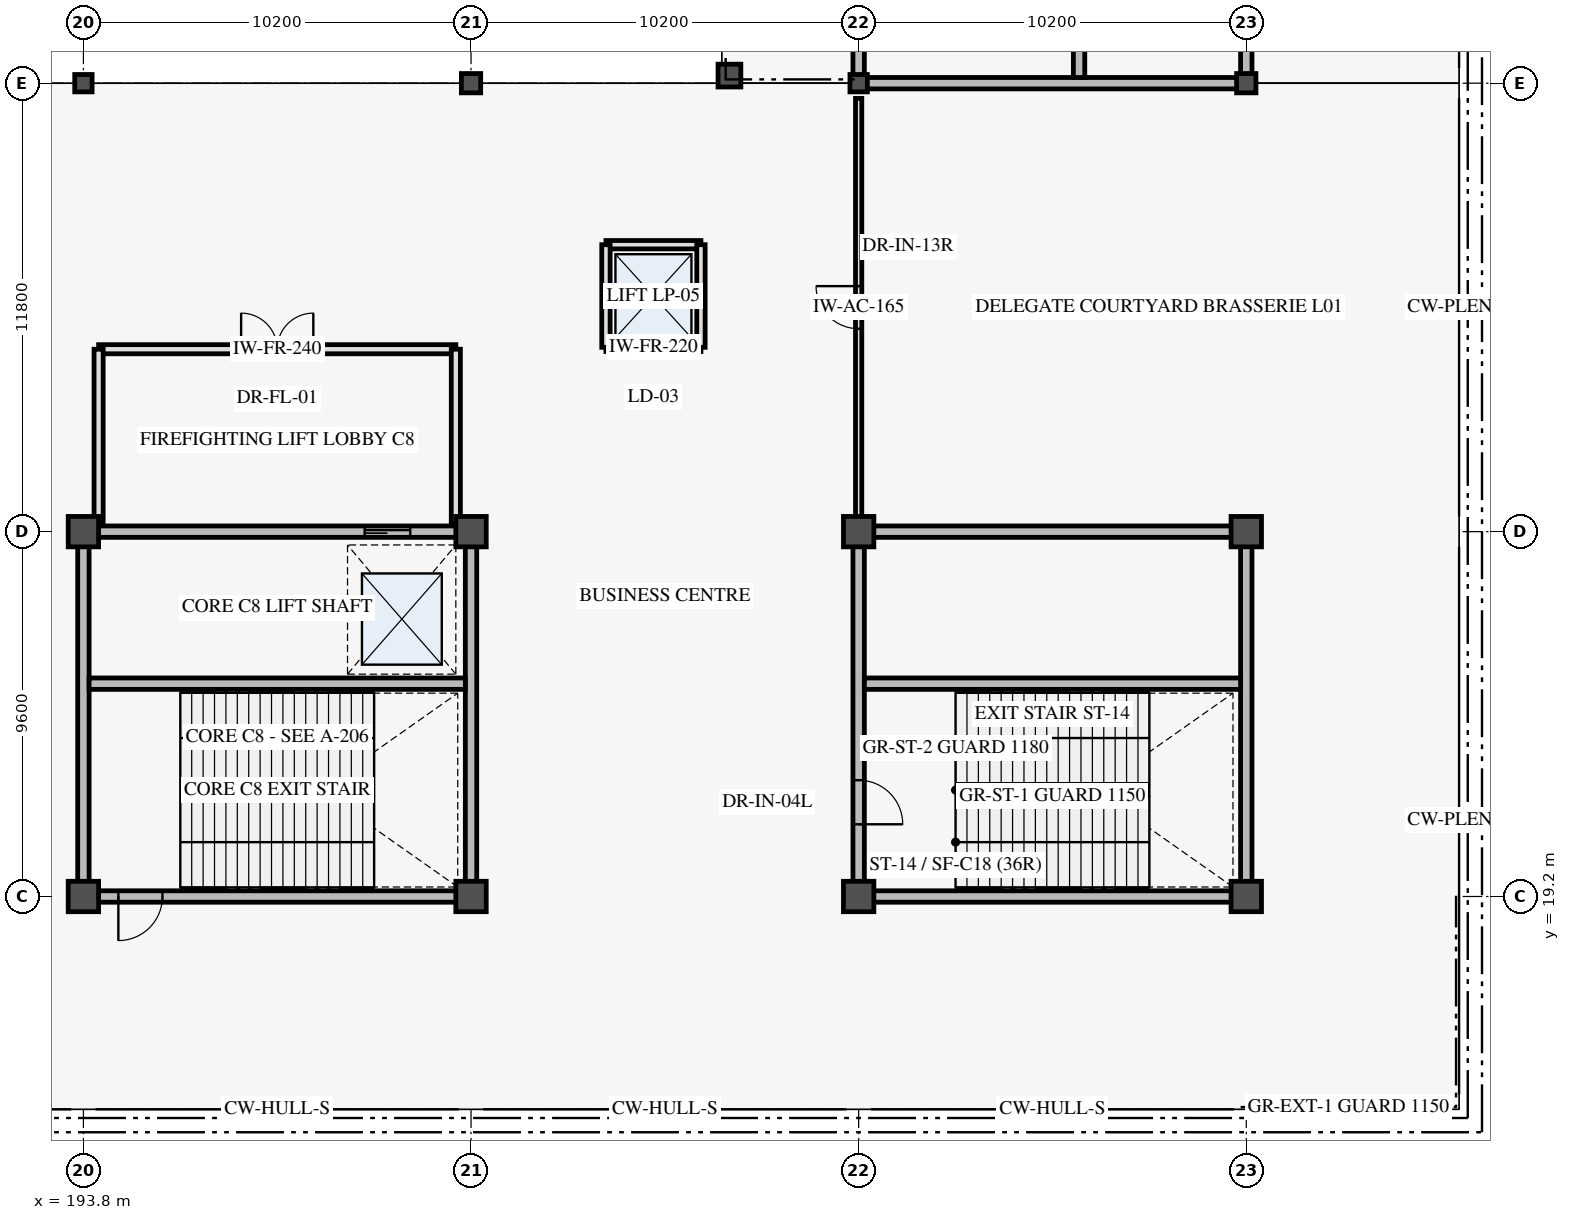
"""IFC4 building model, lengths in metres.
Left out: names, types, materials, properties, quantities, classifications, styles, units other than length and angle.
Written with IfcOpenShell. Run it as: python <this file> out.ifc"""

import sys

from ifc_helpers import new_model, si_unit, direction, frame, frame_2d, origin, origin_2d, place, context, subcontext, project, spatial, rectangle, hollow_circle, extrude, element, fill, save


model = new_model("IFC4")
c1 = context("Model", 3, precision=1e-05, world=origin(), true_north=direction((0.0, 1.0)))
c2 = subcontext(c1, "Body", "Model", "MODEL_VIEW")
j1 = project(units=[si_unit("LENGTHUNIT", "METRE"), si_unit("PLANEANGLEUNIT", "RADIAN")], contexts=[c1])
p1 = place(None, origin())
s1 = spatial("IfcSite", under=j1, at=p1, CompositionType="ELEMENT")
p2 = place(p1, origin())
s2 = spatial("IfcBuilding", under=s1, at=p2, CompositionType="ELEMENT")
p3 = place(p2, frame((0.0, 0.0, 5.4)))
s3 = spatial("IfcBuildingStorey", under=s2, at=p3, CompositionType="ELEMENT", Elevation=5.4)
for number, where, z_axis, x_axis in (
    (1, (193.8, 19.2, 0.0), (0.0, 0.0, 1.0), (1.0, 0.0, 0.0)),
    (2, (193.8, 28.8, 0.0), (0.0, 0.0, 1.0), (1.0, 0.0, 0.0)),
):
    element("IfcColumn", number, at=place(p3, frame(where, z_axis=z_axis, x_axis=x_axis)), inside=s3, PredefinedType="COLUMN", context=c2, shape_type="SweptSolid", body=[
        extrude(rectangle(XDim=0.8, YDim=0.8, at=origin_2d()), origin(), (0.0, 0.0, 1.0), 5.4),
    ])
p4 = place(p3, frame((193.8, 40.6, 0.0), z_axis=(0.0, 0.0, 1.0), x_axis=(1.0, 0.0, 0.0)))
e3 = element("IfcColumn", 3, at=p4, inside=s3, PredefinedType="COLUMN", context=c2, shape_type="SweptSolid", body=[
    extrude(hollow_circle(Radius=0.229, WallThickness=0.02, at=origin_2d()), origin(), (0.0, 0.0, 1.0), 5.4),
])
for number, where, z_axis, x_axis in (
    (4, (204.0, 19.2, 0.0), (0.0, 0.0, 1.0), (1.0, 0.0, 0.0)),
    (5, (204.0, 28.8, 0.0), (0.0, 0.0, 1.0), (1.0, 0.0, 0.0)),
):
    element("IfcColumn", number, at=place(p3, frame(where, z_axis=z_axis, x_axis=x_axis)), inside=s3, PredefinedType="COLUMN", context=c2, shape_type="SweptSolid", body=[
        extrude(rectangle(XDim=0.8, YDim=0.8, at=origin_2d()), origin(), (0.0, 0.0, 1.0), 5.4),
    ])
p5 = place(p3, frame((204.0, 40.6, 0.0), z_axis=(0.0, 0.0, 1.0), x_axis=(1.0, 0.0, 0.0)))
e6 = element("IfcColumn", 6, at=p5, inside=s3, PredefinedType="COLUMN", context=c2, shape_type="SweptSolid", body=[
    extrude(hollow_circle(Radius=0.254, WallThickness=0.02, at=origin_2d()), origin(), (0.0, 0.0, 1.0), 5.4),
])
for number, where, z_axis, x_axis in (
    (7, (214.2, 19.2, 0.0), (0.0, 0.0, 1.0), (1.0, 0.0, 0.0)),
    (8, (214.2, 28.8, 0.0), (0.0, 0.0, 1.0), (1.0, 0.0, 0.0)),
):
    element("IfcColumn", number, at=place(p3, frame(where, z_axis=z_axis, x_axis=x_axis)), inside=s3, PredefinedType="COLUMN", context=c2, shape_type="SweptSolid", body=[
        extrude(rectangle(XDim=0.8, YDim=0.8, at=origin_2d()), origin(), (0.0, 0.0, 1.0), 5.4),
    ])
p6 = place(p3, frame((214.2, 40.6, 0.0), z_axis=(0.0, 0.0, 1.0), x_axis=(1.0, 0.0, 0.0)))
e9 = element("IfcColumn", 9, at=p6, inside=s3, PredefinedType="COLUMN", context=c2, shape_type="SweptSolid", body=[
    extrude(hollow_circle(Radius=0.229, WallThickness=0.02, at=origin_2d()), origin(), (0.0, 0.0, 1.0), 5.4),
])
for number, where, z_axis, x_axis in (
    (10, (224.4, 19.2, 0.0), (0.0, 0.0, 1.0), (1.0, 0.0, 0.0)),
    (11, (224.4, 28.8, 0.0), (0.0, 0.0, 1.0), (1.0, 0.0, 0.0)),
):
    element("IfcColumn", number, at=place(p3, frame(where, z_axis=z_axis, x_axis=x_axis)), inside=s3, PredefinedType="COLUMN", context=c2, shape_type="SweptSolid", body=[
        extrude(rectangle(XDim=0.8, YDim=0.8, at=origin_2d()), origin(), (0.0, 0.0, 1.0), 5.4),
    ])
p7 = place(p3, frame((224.4, 40.6, 0.0), z_axis=(0.0, 0.0, 1.0), x_axis=(1.0, 0.0, 0.0)))
e12 = element("IfcColumn", 12, at=p7, inside=s3, PredefinedType="COLUMN", context=c2, shape_type="SweptSolid", body=[
    extrude(hollow_circle(Radius=0.254, WallThickness=0.02, at=origin_2d()), origin(), (0.0, 0.0, 1.0), 5.4),
])
p8 = place(p3, frame((193.8, 19.2, 0.0), z_axis=(0.0, 0.0, 1.0), x_axis=(1.0, 0.0, 0.0)))
e13 = element("IfcWall", 13, at=p8, inside=s3, PredefinedType="SHEAR", context=c2, shape_type="SweptSolid", body=[
    extrude(rectangle(XDim=10.2, YDim=0.3, at=frame_2d((5.1, 0.0))), origin(), (0.0, 0.0, 1.0), 5.4),
])
p9 = place(p8, frame((0.92, 0.0, 0.0)))
e14 = element("IfcOpeningElement", 14, at=p9, cuts=e13, PredefinedType="OPENING", context=c2, shape_type="SweptSolid", body=[
    extrude(rectangle(XDim=1.16, YDim=2.2, at=frame_2d((0.58, 1.1))), frame((0.0, 0.16, 0.0), z_axis=(0.0, -1.0, 0.0), x_axis=(1.0, 0.0, 0.0)), (0.0, 0.0, 1.0), 0.32),
])
p10 = place(p3, frame((193.8, 28.8, 0.0), z_axis=(0.0, 0.0, 1.0), x_axis=(1.0, 0.0, 0.0)))
e15 = element("IfcWall", 15, at=p10, inside=s3, PredefinedType="SHEAR", context=c2, shape_type="SweptSolid", body=[
    extrude(rectangle(XDim=10.2, YDim=0.3, at=frame_2d((5.1, 0.0))), origin(), (0.0, 0.0, 1.0), 5.4),
])
p11 = place(p10, frame((7.4, 0.0, 0.0)))
e16 = element("IfcOpeningElement", 16, at=p11, cuts=e15, PredefinedType="OPENING", context=c2, shape_type="SweptSolid", body=[
    extrude(rectangle(XDim=1.2, YDim=2.25, at=frame_2d((0.6, 1.125))), frame((0.0, 0.16, 0.0), z_axis=(0.0, -1.0, 0.0), x_axis=(1.0, 0.0, 0.0)), (0.0, 0.0, 1.0), 0.32),
])
for number, where, z_axis, x_axis in (
    (17, (193.8, 19.2, 0.0), (0.0, 0.0, 1.0), (0.0, 1.0, 0.0)),
    (18, (204.0, 19.2, 0.0), (0.0, 0.0, 1.0), (0.0, 1.0, 0.0)),
):
    element("IfcWall", number, at=place(p3, frame(where, z_axis=z_axis, x_axis=x_axis)), inside=s3, PredefinedType="SHEAR", context=c2, shape_type="SweptSolid", body=[
        extrude(rectangle(XDim=9.6, YDim=0.3, at=frame_2d((4.8, 0.0))), origin(), (0.0, 0.0, 1.0), 5.4),
    ])
p12 = place(p3, frame((210.8, 40.8, 0.0), z_axis=(0.0, 0.0, 1.0), x_axis=(1.0, 0.0, 0.0)))
e19 = element("IfcColumn", 19, at=p12, inside=s3, PredefinedType="COLUMN", context=c2, shape_type="SweptSolid", body=[
    extrude(rectangle(XDim=0.6, YDim=0.6, at=origin_2d()), origin(), (0.0, 0.0, 1.0), 5.12),
])
p13 = place(p3, frame((193.95, 24.8, 0.0), z_axis=(0.0, 0.0, 1.0), x_axis=(1.0, 0.0, 0.0)))
e20 = element("IfcWall", 20, at=p13, inside=s3, PredefinedType="SHEAR", context=c2, shape_type="SweptSolid", body=[
    extrude(rectangle(XDim=9.9, YDim=0.3, at=frame_2d((4.95, 0.0))), origin(), (0.0, 0.0, 1.0), 5.4),
])
for number, where, z_axis, x_axis in (
    (21, (214.2, 19.2, 0.0), (0.0, 0.0, 1.0), (1.0, 0.0, 0.0)),
    (22, (214.2, 28.8, 0.0), (0.0, 0.0, 1.0), (1.0, 0.0, 0.0)),
):
    element("IfcWall", number, at=place(p3, frame(where, z_axis=z_axis, x_axis=x_axis)), inside=s3, PredefinedType="SHEAR", context=c2, shape_type="SweptSolid", body=[
        extrude(rectangle(XDim=10.2, YDim=0.3, at=frame_2d((5.1, 0.0))), origin(), (0.0, 0.0, 1.0), 5.4),
    ])
p14 = place(p3, frame((214.2, 19.2, 0.0), z_axis=(0.0, 0.0, 1.0), x_axis=(0.0, 1.0, 0.0)))
e23 = element("IfcWall", 23, at=p14, inside=s3, PredefinedType="SHEAR", context=c2, shape_type="SweptSolid", body=[
    extrude(rectangle(XDim=9.6, YDim=0.3, at=frame_2d((4.8, 0.0))), origin(), (0.0, 0.0, 1.0), 5.4),
])
p15 = place(p14, frame((1.9, 0.0, 0.0)))
e24 = element("IfcOpeningElement", 24, at=p15, cuts=e23, PredefinedType="OPENING", context=c2, shape_type="SweptSolid", body=[
    extrude(rectangle(XDim=1.16, YDim=2.2, at=frame_2d((0.58, 1.1))), frame((0.0, 0.16, 0.0), z_axis=(0.0, -1.0, 0.0), x_axis=(1.0, 0.0, 0.0)), (0.0, 0.0, 1.0), 0.32),
])
p16 = place(p3, frame((224.4, 19.2, 0.0), z_axis=(0.0, 0.0, 1.0), x_axis=(0.0, 1.0, 0.0)))
e25 = element("IfcWall", 25, at=p16, inside=s3, PredefinedType="SHEAR", context=c2, shape_type="SweptSolid", body=[
    extrude(rectangle(XDim=9.6, YDim=0.3, at=frame_2d((4.8, 0.0))), origin(), (0.0, 0.0, 1.0), 5.4),
])
p17 = place(p3, frame((214.35, 24.8, 0.0), z_axis=(0.0, 0.0, 1.0), x_axis=(1.0, 0.0, 0.0)))
e26 = element("IfcWall", 26, at=p17, inside=s3, PredefinedType="SHEAR", context=c2, shape_type="SweptSolid", body=[
    extrude(rectangle(XDim=9.9, YDim=0.3, at=frame_2d((4.95, 0.0))), origin(), (0.0, 0.0, 1.0), 5.4),
])
p18 = place(p3, frame((214.2, 40.6, 0.0), z_axis=(0.0, 0.0, 1.0), x_axis=(1.0, 0.0, 0.0)))
e27 = element("IfcWall", 27, at=p18, inside=s3, PredefinedType="SHEAR", context=c2, shape_type="SweptSolid", body=[
    extrude(rectangle(XDim=10.2, YDim=0.3, at=frame_2d((5.1, 0.0))), origin(), (0.0, 0.0, 1.0), 5.4),
])
p19 = place(p3, frame((214.2, 40.6, 0.0), z_axis=(0.0, 0.0, 1.0), x_axis=(0.0, 1.0, 0.0)))
e28 = element("IfcWall", 28, at=p19, inside=s3, PredefinedType="SHEAR", context=c2, shape_type="SweptSolid", body=[
    extrude(rectangle(XDim=11.8, YDim=0.3, at=frame_2d((5.9, 0.0))), origin(), (0.0, 0.0, 1.0), 5.4),
])
p20 = place(p19, frame((0.92, 0.0, 0.0)))
e29 = element("IfcOpeningElement", 29, at=p20, cuts=e28, PredefinedType="OPENING", context=c2, shape_type="SweptSolid", body=[
    extrude(rectangle(XDim=1.16, YDim=2.2, at=frame_2d((0.58, 1.1))), frame((0.0, 0.16, 0.0), z_axis=(0.0, -1.0, 0.0), x_axis=(1.0, 0.0, 0.0)), (0.0, 0.0, 1.0), 0.32),
])
p21 = place(p3, frame((224.4, 40.6, 0.0), z_axis=(0.0, 0.0, 1.0), x_axis=(0.0, 1.0, 0.0)))
e30 = element("IfcWall", 30, at=p21, inside=s3, PredefinedType="SHEAR", context=c2, shape_type="SweptSolid", body=[
    extrude(rectangle(XDim=11.8, YDim=0.3, at=frame_2d((5.9, 0.0))), origin(), (0.0, 0.0, 1.0), 5.4),
])
p22 = place(p3, frame((220.0, 40.75, 0.0), z_axis=(0.0, 0.0, 1.0), x_axis=(0.0, 1.0, 0.0)))
e31 = element("IfcWall", 31, at=p22, inside=s3, PredefinedType="SHEAR", context=c2, shape_type="SweptSolid", body=[
    extrude(rectangle(XDim=11.5, YDim=0.3, at=frame_2d((5.75, 0.0))), origin(), (0.0, 0.0, 1.0), 5.4),
])
p23 = place(p3, frame((207.55, 33.65, 0.0), z_axis=(0.0, 0.0, 1.0), x_axis=(1.0, 0.0, 0.0)))
e32 = element("IfcWall", 32, at=p23, inside=s3, PredefinedType="PARTITIONING", context=c2, shape_type="SweptSolid", body=[
    extrude(rectangle(XDim=2.5, YDim=0.22, at=frame_2d((1.25, 0.0))), origin(), (0.0, 0.0, 1.0), 5.12),
])
p24 = place(p23, frame((0.575, 0.0, 0.0)))
e33 = element("IfcOpeningElement", 33, at=p24, cuts=e32, PredefinedType="OPENING", context=c2, shape_type="SweptSolid", body=[
    extrude(rectangle(XDim=1.35, YDim=2.3, at=frame_2d((0.675, 1.15))), frame((0.0, 0.12, 0.0), z_axis=(0.0, -1.0, 0.0), x_axis=(1.0, 0.0, 0.0)), (0.0, 0.0, 1.0), 0.24),
])
p25 = place(p3, frame((207.55, 36.35, 0.0), z_axis=(0.0, 0.0, 1.0), x_axis=(1.0, 0.0, 0.0)))
e34 = element("IfcWall", 34, at=p25, inside=s3, PredefinedType="PARTITIONING", context=c2, shape_type="SweptSolid", body=[
    extrude(rectangle(XDim=2.5, YDim=0.22, at=frame_2d((1.25, 0.0))), origin(), (0.0, 0.0, 1.0), 5.12),
])
for number, where, z_axis, x_axis in (
    (35, (207.55, 33.65, 0.0), (0.0, 0.0, 1.0), (0.0, 1.0, 0.0)),
    (36, (210.05, 33.65, 0.0), (0.0, 0.0, 1.0), (0.0, 1.0, 0.0)),
):
    element("IfcWall", number, at=place(p3, frame(where, z_axis=z_axis, x_axis=x_axis)), inside=s3, PredefinedType="PARTITIONING", context=c2, shape_type="SweptSolid", body=[
        extrude(rectangle(XDim=2.7, YDim=0.22, at=frame_2d((1.35, 0.0))), origin(), (0.0, 0.0, 1.0), 5.12),
    ])
p26 = place(p3, frame((194.2, 33.6, 0.0), z_axis=(0.0, 0.0, 1.0), x_axis=(1.0, 0.0, 0.0)))
e37 = element("IfcWall", 37, at=p26, inside=s3, PredefinedType="PARTITIONING", context=c2, shape_type="SweptSolid", body=[
    extrude(rectangle(XDim=9.4, YDim=0.24, at=frame_2d((4.7, 0.0))), origin(), (0.0, 0.0, 1.0), 4.2),
])
p27 = place(p26, frame((3.75, 0.0, 0.0)))
e38 = element("IfcOpeningElement", 38, at=p27, cuts=e37, PredefinedType="OPENING", context=c2, shape_type="SweptSolid", body=[
    extrude(rectangle(XDim=1.9, YDim=2.25, at=frame_2d((0.95, 1.125))), frame((0.0, 0.13, 0.0), z_axis=(0.0, -1.0, 0.0), x_axis=(1.0, 0.0, 0.0)), (0.0, 0.0, 1.0), 0.26),
])
for number, where, z_axis, x_axis in (
    (39, (203.6, 29.0, 0.0), (0.0, 0.0, 1.0), (0.0, 1.0, 0.0)),
    (40, (194.2, 29.0, 0.0), (0.0, 0.0, 1.0), (0.0, 1.0, 0.0)),
):
    element("IfcWall", number, at=place(p3, frame(where, z_axis=z_axis, x_axis=x_axis)), inside=s3, PredefinedType="PARTITIONING", context=c2, shape_type="SweptSolid", body=[
        extrude(rectangle(XDim=4.6, YDim=0.24, at=frame_2d((2.3, 0.0))), origin(), (0.0, 0.0, 1.0), 4.2),
    ])
p28 = place(p3, frame((214.2, 29.2, 0.0), z_axis=(0.0, 0.0, 1.0), x_axis=(0.0, 1.0, 0.0)))
e41 = element("IfcWall", 41, at=p28, inside=s3, PredefinedType="PARTITIONING", context=c2, shape_type="SweptSolid", body=[
    extrude(rectangle(XDim=11.0, YDim=0.165, at=frame_2d((5.5, 0.0))), origin(), (0.0, 0.0, 1.0), 4.2),
])
p29 = place(p28, frame((4.94, 0.0, 0.0)))
e42 = element("IfcOpeningElement", 42, at=p29, cuts=e41, PredefinedType="OPENING", context=c2, shape_type="SweptSolid", body=[
    extrude(rectangle(XDim=1.12, YDim=2.18, at=frame_2d((0.56, 1.09))), frame((0.0, 0.093, 0.0), z_axis=(0.0, -1.0, 0.0), x_axis=(1.0, 0.0, 0.0)), (0.0, 0.0, 1.0), 0.185),
])
p30 = place(p9, origin())
e43 = element("IfcDoor", 43, at=p30, inside=s3, OperationType="SINGLE_SWING_LEFT", PredefinedType="DOOR", context=c2, shape_type="SweptSolid", body=[
    extrude(rectangle(XDim=1.16, YDim=2.2, at=frame_2d((0.58, 1.1))), frame((0.0, 0.025, 0.0), z_axis=(0.0, -1.0, 0.0), x_axis=(1.0, 0.0, 0.0)), (0.0, 0.0, 1.0), 0.05),
])
fill(e14, e43)
p31 = place(p11, origin())
e44 = element("IfcDoor", 44, at=p31, inside=s3, OperationType="SLIDING_TO_LEFT", PredefinedType="DOOR", context=c2, shape_type="SweptSolid", body=[
    extrude(rectangle(XDim=1.2, YDim=2.25, at=frame_2d((0.6, 1.125))), frame((0.0, 0.025, 0.0), z_axis=(0.0, -1.0, 0.0), x_axis=(1.0, 0.0, 0.0)), (0.0, 0.0, 1.0), 0.05),
])
fill(e16, e44)
p32 = place(p15, origin())
e45 = element("IfcDoor", 45, at=p32, inside=s3, OperationType="SINGLE_SWING_LEFT", PredefinedType="DOOR", context=c2, shape_type="SweptSolid", body=[
    extrude(rectangle(XDim=1.16, YDim=2.2, at=frame_2d((0.58, 1.1))), frame((0.0, 0.025, 0.0), z_axis=(0.0, -1.0, 0.0), x_axis=(1.0, 0.0, 0.0)), (0.0, 0.0, 1.0), 0.05),
])
fill(e24, e45)
p33 = place(p24, origin())
e46 = element("IfcDoor", 46, at=p33, inside=s3, OperationType="DOUBLE_DOOR_SLIDING", PredefinedType="DOOR", context=c2, shape_type="SweptSolid", body=[
    extrude(rectangle(XDim=1.35, YDim=2.3, at=frame_2d((0.675, 1.15))), frame((0.0, 0.025, 0.0), z_axis=(0.0, -1.0, 0.0), x_axis=(1.0, 0.0, 0.0)), (0.0, 0.0, 1.0), 0.05),
])
fill(e33, e46)
p34 = place(p27, origin())
e47 = element("IfcDoor", 47, at=p34, inside=s3, OperationType="DOUBLE_DOOR_SINGLE_SWING", PredefinedType="DOOR", context=c2, shape_type="SweptSolid", body=[
    extrude(rectangle(XDim=1.9, YDim=2.25, at=frame_2d((0.95, 1.125))), frame((0.0, 0.025, 0.0), z_axis=(0.0, -1.0, 0.0), x_axis=(1.0, 0.0, 0.0)), (0.0, 0.0, 1.0), 0.05),
])
fill(e38, e47)
p35 = place(p29, origin())
e48 = element("IfcDoor", 48, at=p35, inside=s3, OperationType="SINGLE_SWING_RIGHT", PredefinedType="DOOR", context=c2, shape_type="SweptSolid", body=[
    extrude(rectangle(XDim=1.12, YDim=2.18, at=frame_2d((0.56, 1.09))), frame((0.0, 0.025, 0.0), z_axis=(0.0, -1.0, 0.0), x_axis=(1.0, 0.0, 0.0)), (0.0, 0.0, 1.0), 0.05),
])
fill(e42, e48)
save(model, sys.argv[1])
